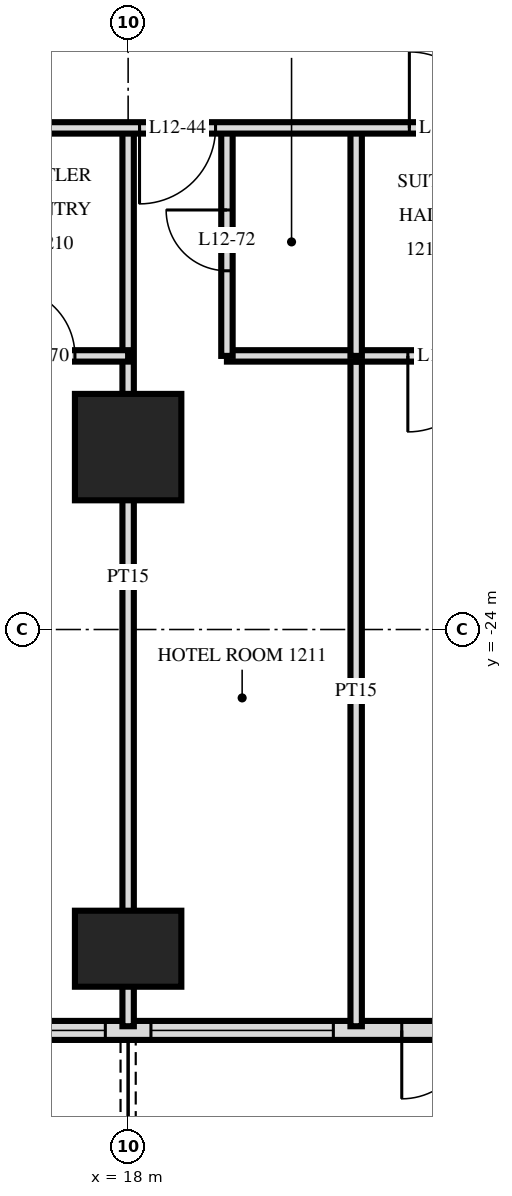
"""IFC4 building model, lengths in metres.
Left out: names, types, materials, properties, quantities, classifications, styles, units other than length and angle.
Written with IfcOpenShell. Run it as: python <this file> out.ifc"""

import sys

from ifc_helpers import new_model, si_unit, direction, frame, frame_2d, origin, origin_2d, place, context, subcontext, project, spatial, rectangle, extrude, element, fill, save


model = new_model("IFC4")
c1 = context("Model", 3, precision=1e-05, world=origin(), true_north=direction((0.0, 1.0)))
c2 = subcontext(c1, "Body", "Model", "MODEL_VIEW")
j1 = project(units=[si_unit("LENGTHUNIT", "METRE"), si_unit("PLANEANGLEUNIT", "RADIAN")], contexts=[c1])
p1 = place(None, origin())
s1 = spatial("IfcSite", under=j1, at=p1, CompositionType="ELEMENT")
p2 = place(p1, origin())
s2 = spatial("IfcBuilding", under=s1, at=p2, CompositionType="ELEMENT")
p3 = place(p2, frame((0.0, 0.0, 52.8)))
s3 = spatial("IfcBuildingStorey", under=s2, at=p3, CompositionType="ELEMENT", Elevation=52.8)
p4 = place(p3, frame((18.0, -28.2, 0.0), z_axis=(0.0, 0.0, 1.0), x_axis=(1.0, 0.0, 0.0)))
e1 = element("IfcColumn", 1, at=p4, inside=s3, PredefinedType="COLUMN", context=c2, shape_type="SweptSolid", body=[
    extrude(rectangle(XDim=1.4, YDim=1.0, at=origin_2d()), origin(), (0.0, 0.0, 1.0), 3.6),
])
p5 = place(p3, frame((18.0, -21.6, 0.0), z_axis=(0.0, 0.0, 1.0), x_axis=(1.0, 0.0, 0.0)))
e2 = element("IfcColumn", 2, at=p5, inside=s3, PredefinedType="COLUMN", context=c2, shape_type="SweptSolid", body=[
    extrude(rectangle(XDim=1.4, YDim=1.4, at=origin_2d()), origin(), (0.0, 0.0, 1.0), 3.6),
])
p6 = place(p3, frame((-28.775, -29.275, 0.0), z_axis=(0.0, 0.0, 1.0), x_axis=(1.0, 0.0, 0.0)))
e3 = element("IfcWall", 3, at=p6, inside=s3, PredefinedType="SOLIDWALL", context=c2, shape_type="SweptSolid", body=[
    extrude(rectangle(XDim=57.551, YDim=0.25, at=frame_2d((28.775, 0.0))), origin(), (0.0, 0.0, 1.0), 3.32),
])
p7 = place(p6, frame((0.575, 0.0, 0.0)))
e4 = element("IfcOpeningElement", 4, at=p7, cuts=e3, PredefinedType="OPENING", context=c2, shape_type="SweptSolid", body=[
    extrude(rectangle(XDim=1.8, YDim=2.4, at=frame_2d((0.9, 1.2))), frame((0.0, 0.135, 0.0), z_axis=(0.0, -1.0, 0.0), x_axis=(1.0, 0.0, 0.0)), (0.0, 0.0, 1.0), 0.27),
])
p8 = place(p6, frame((5.375, 0.0, 0.0)))
e5 = element("IfcOpeningElement", 5, at=p8, cuts=e3, PredefinedType="OPENING", context=c2, shape_type="SweptSolid", body=[
    extrude(rectangle(XDim=1.8, YDim=2.4, at=frame_2d((0.9, 1.2))), frame((0.0, 0.135, 0.0), z_axis=(0.0, -1.0, 0.0), x_axis=(1.0, 0.0, 0.0)), (0.0, 0.0, 1.0), 0.27),
])
p9 = place(p6, frame((8.075, 0.0, 0.3)))
e6 = element("IfcOpeningElement", 6, at=p9, cuts=e3, PredefinedType="OPENING", context=c2, shape_type="SweptSolid", body=[
    extrude(rectangle(XDim=2.4, YDim=2.1, at=frame_2d((1.2, 1.05))), frame((0.0, 0.135, 0.0), z_axis=(0.0, -1.0, 0.0), x_axis=(1.0, 0.0, 0.0)), (0.0, 0.0, 1.0), 0.27),
])
p10 = place(p6, frame((11.375, 0.0, 0.0)))
e7 = element("IfcOpeningElement", 7, at=p10, cuts=e3, PredefinedType="OPENING", context=c2, shape_type="SweptSolid", body=[
    extrude(rectangle(XDim=1.8, YDim=2.4, at=frame_2d((0.9, 1.2))), frame((0.0, 0.135, 0.0), z_axis=(0.0, -1.0, 0.0), x_axis=(1.0, 0.0, 0.0)), (0.0, 0.0, 1.0), 0.27),
])
p11 = place(p6, frame((14.075, 0.0, 0.3)))
e8 = element("IfcOpeningElement", 8, at=p11, cuts=e3, PredefinedType="OPENING", context=c2, shape_type="SweptSolid", body=[
    extrude(rectangle(XDim=2.4, YDim=2.1, at=frame_2d((1.2, 1.05))), frame((0.0, 0.135, 0.0), z_axis=(0.0, -1.0, 0.0), x_axis=(1.0, 0.0, 0.0)), (0.0, 0.0, 1.0), 0.27),
])
p12 = place(p6, frame((17.375, 0.0, 0.0)))
e9 = element("IfcOpeningElement", 9, at=p12, cuts=e3, PredefinedType="OPENING", context=c2, shape_type="SweptSolid", body=[
    extrude(rectangle(XDim=1.8, YDim=2.4, at=frame_2d((0.9, 1.2))), frame((0.0, 0.135, 0.0), z_axis=(0.0, -1.0, 0.0), x_axis=(1.0, 0.0, 0.0)), (0.0, 0.0, 1.0), 0.27),
])
p13 = place(p6, frame((20.075, 0.0, 0.3)))
e10 = element("IfcOpeningElement", 10, at=p13, cuts=e3, PredefinedType="OPENING", context=c2, shape_type="SweptSolid", body=[
    extrude(rectangle(XDim=2.4, YDim=2.1, at=frame_2d((1.2, 1.05))), frame((0.0, 0.135, 0.0), z_axis=(0.0, -1.0, 0.0), x_axis=(1.0, 0.0, 0.0)), (0.0, 0.0, 1.0), 0.27),
])
p14 = place(p6, frame((23.075, 0.0, 0.3)))
e11 = element("IfcOpeningElement", 11, at=p14, cuts=e3, PredefinedType="OPENING", context=c2, shape_type="SweptSolid", body=[
    extrude(rectangle(XDim=2.4, YDim=2.1, at=frame_2d((1.2, 1.05))), frame((0.0, 0.135, 0.0), z_axis=(0.0, -1.0, 0.0), x_axis=(1.0, 0.0, 0.0)), (0.0, 0.0, 1.0), 0.27),
])
p15 = place(p6, frame((26.375, 0.0, 0.0)))
e12 = element("IfcOpeningElement", 12, at=p15, cuts=e3, PredefinedType="OPENING", context=c2, shape_type="SweptSolid", body=[
    extrude(rectangle(XDim=1.8, YDim=2.4, at=frame_2d((0.9, 1.2))), frame((0.0, 0.135, 0.0), z_axis=(0.0, -1.0, 0.0), x_axis=(1.0, 0.0, 0.0)), (0.0, 0.0, 1.0), 0.27),
])
p16 = place(p6, frame((29.375, 0.0, 0.0)))
e13 = element("IfcOpeningElement", 13, at=p16, cuts=e3, PredefinedType="OPENING", context=c2, shape_type="SweptSolid", body=[
    extrude(rectangle(XDim=1.8, YDim=2.4, at=frame_2d((0.9, 1.2))), frame((0.0, 0.135, 0.0), z_axis=(0.0, -1.0, 0.0), x_axis=(1.0, 0.0, 0.0)), (0.0, 0.0, 1.0), 0.27),
])
p17 = place(p6, frame((32.075, 0.0, 0.3)))
e14 = element("IfcOpeningElement", 14, at=p17, cuts=e3, PredefinedType="OPENING", context=c2, shape_type="SweptSolid", body=[
    extrude(rectangle(XDim=2.4, YDim=2.1, at=frame_2d((1.2, 1.05))), frame((0.0, 0.135, 0.0), z_axis=(0.0, -1.0, 0.0), x_axis=(1.0, 0.0, 0.0)), (0.0, 0.0, 1.0), 0.27),
])
p18 = place(p6, frame((35.075, 0.0, 0.3)))
e15 = element("IfcOpeningElement", 15, at=p18, cuts=e3, PredefinedType="OPENING", context=c2, shape_type="SweptSolid", body=[
    extrude(rectangle(XDim=2.4, YDim=2.1, at=frame_2d((1.2, 1.05))), frame((0.0, 0.135, 0.0), z_axis=(0.0, -1.0, 0.0), x_axis=(1.0, 0.0, 0.0)), (0.0, 0.0, 1.0), 0.27),
])
p19 = place(p6, frame((38.375, 0.0, 0.0)))
e16 = element("IfcOpeningElement", 16, at=p19, cuts=e3, PredefinedType="OPENING", context=c2, shape_type="SweptSolid", body=[
    extrude(rectangle(XDim=1.8, YDim=2.4, at=frame_2d((0.9, 1.2))), frame((0.0, 0.135, 0.0), z_axis=(0.0, -1.0, 0.0), x_axis=(1.0, 0.0, 0.0)), (0.0, 0.0, 1.0), 0.27),
])
p20 = place(p6, frame((41.375, 0.0, 0.0)))
e17 = element("IfcOpeningElement", 17, at=p20, cuts=e3, PredefinedType="OPENING", context=c2, shape_type="SweptSolid", body=[
    extrude(rectangle(XDim=1.8, YDim=2.4, at=frame_2d((0.9, 1.2))), frame((0.0, 0.135, 0.0), z_axis=(0.0, -1.0, 0.0), x_axis=(1.0, 0.0, 0.0)), (0.0, 0.0, 1.0), 0.27),
])
p21 = place(p6, frame((44.075, 0.0, 0.3)))
e18 = element("IfcOpeningElement", 18, at=p21, cuts=e3, PredefinedType="OPENING", context=c2, shape_type="SweptSolid", body=[
    extrude(rectangle(XDim=2.4, YDim=2.1, at=frame_2d((1.2, 1.05))), frame((0.0, 0.135, 0.0), z_axis=(0.0, -1.0, 0.0), x_axis=(1.0, 0.0, 0.0)), (0.0, 0.0, 1.0), 0.27),
])
p22 = place(p6, frame((47.075, 0.0, 0.3)))
e19 = element("IfcOpeningElement", 19, at=p22, cuts=e3, PredefinedType="OPENING", context=c2, shape_type="SweptSolid", body=[
    extrude(rectangle(XDim=2.4, YDim=2.1, at=frame_2d((1.2, 1.05))), frame((0.0, 0.135, 0.0), z_axis=(0.0, -1.0, 0.0), x_axis=(1.0, 0.0, 0.0)), (0.0, 0.0, 1.0), 0.27),
])
p23 = place(p6, frame((50.375, 0.0, 0.0)))
e20 = element("IfcOpeningElement", 20, at=p23, cuts=e3, PredefinedType="OPENING", context=c2, shape_type="SweptSolid", body=[
    extrude(rectangle(XDim=1.8, YDim=2.4, at=frame_2d((0.9, 1.2))), frame((0.0, 0.135, 0.0), z_axis=(0.0, -1.0, 0.0), x_axis=(1.0, 0.0, 0.0)), (0.0, 0.0, 1.0), 0.27),
])
p24 = place(p6, frame((53.375, 0.0, 0.0)))
e21 = element("IfcOpeningElement", 21, at=p24, cuts=e3, PredefinedType="OPENING", context=c2, shape_type="SweptSolid", body=[
    extrude(rectangle(XDim=1.8, YDim=2.4, at=frame_2d((0.9, 1.2))), frame((0.0, 0.135, 0.0), z_axis=(0.0, -1.0, 0.0), x_axis=(1.0, 0.0, 0.0)), (0.0, 0.0, 1.0), 0.27),
])
p25 = place(p3, frame((21.0, -20.4, 0.0), z_axis=(0.0, 0.0, 1.0), x_axis=(0.0, 1.0, 0.0)))
e22 = element("IfcWall", 22, at=p25, inside=s3, PredefinedType="PARTITIONING", context=c2, shape_type="SweptSolid", body=[
    extrude(rectangle(XDim=3.0, YDim=0.15, at=frame_2d((1.5, 0.0))), origin(), (0.0, 0.0, 1.0), 3.32),
])
p26 = place(p3, frame((21.0, -29.22, 0.0), z_axis=(0.0, 0.0, 1.0), x_axis=(0.0, 1.0, 0.0)))
e23 = element("IfcWall", 23, at=p26, inside=s3, PredefinedType="PARTITIONING", context=c2, shape_type="SweptSolid", body=[
    extrude(rectangle(XDim=8.82, YDim=0.15, at=frame_2d((4.41, 0.0))), origin(), (0.0, 0.0, 1.0), 3.32),
])
p27 = place(p3, frame((19.3, -20.4, 0.0), z_axis=(0.0, 0.0, 1.0), x_axis=(0.0, 1.0, 0.0)))
e24 = element("IfcWall", 24, at=p27, inside=s3, PredefinedType="PARTITIONING", context=c2, shape_type="SweptSolid", body=[
    extrude(rectangle(XDim=3.0, YDim=0.15, at=frame_2d((1.5, 0.0))), origin(), (0.0, 0.0, 1.0), 3.32),
])
p28 = place(p27, frame((1.12, 0.0, 0.0)))
e25 = element("IfcOpeningElement", 25, at=p28, cuts=e24, PredefinedType="OPENING", context=c2, shape_type="SweptSolid", body=[
    extrude(rectangle(XDim=0.8, YDim=2.1, at=frame_2d((0.4, 1.05))), frame((0.0, 0.085, 0.0), z_axis=(0.0, -1.0, 0.0), x_axis=(1.0, 0.0, 0.0)), (0.0, 0.0, 1.0), 0.17),
])
p29 = place(p3, frame((18.0, -29.22, 0.0), z_axis=(0.0, 0.0, 1.0), x_axis=(0.0, 1.0, 0.0)))
e26 = element("IfcWall", 26, at=p29, inside=s3, PredefinedType="PARTITIONING", context=c2, shape_type="SweptSolid", body=[
    extrude(rectangle(XDim=11.82, YDim=0.15, at=frame_2d((5.91, 0.0))), origin(), (0.0, 0.0, 1.0), 3.32),
])
p30 = place(p3, frame((21.0, -20.4, 0.0), z_axis=(0.0, 0.0, 1.0), x_axis=(1.0, 0.0, 0.0)))
e27 = element("IfcWall", 27, at=p30, inside=s3, PredefinedType="PARTITIONING", context=c2, shape_type="SweptSolid", body=[
    extrude(rectangle(XDim=2.4, YDim=0.15, at=frame_2d((1.2, 0.0))), origin(), (0.0, 0.0, 1.0), 3.32),
])
p31 = place(p30, frame((0.68, 0.0, 0.0)))
e28 = element("IfcOpeningElement", 28, at=p31, cuts=e27, PredefinedType="OPENING", context=c2, shape_type="SweptSolid", body=[
    extrude(rectangle(XDim=1.0, YDim=2.1, at=frame_2d((0.5, 1.05))), frame((0.0, 0.085, 0.0), z_axis=(0.0, -1.0, 0.0), x_axis=(1.0, 0.0, 0.0)), (0.0, 0.0, 1.0), 0.17),
])
p32 = place(p3, frame((10.2, -20.4, 0.0), z_axis=(0.0, 0.0, 1.0), x_axis=(1.0, 0.0, 0.0)))
e29 = element("IfcWall", 29, at=p32, inside=s3, PredefinedType="PARTITIONING", context=c2, shape_type="SweptSolid", body=[
    extrude(rectangle(XDim=7.8, YDim=0.15, at=frame_2d((3.9, 0.0))), origin(), (0.0, 0.0, 1.0), 3.32),
])
p33 = place(p32, frame((0.25, 0.0, 0.0)))
e30 = element("IfcOpeningElement", 30, at=p33, cuts=e29, PredefinedType="OPENING", context=c2, shape_type="SweptSolid", body=[
    extrude(rectangle(XDim=0.8, YDim=2.1, at=frame_2d((0.4, 1.05))), frame((0.0, 0.085, 0.0), z_axis=(0.0, -1.0, 0.0), x_axis=(1.0, 0.0, 0.0)), (0.0, 0.0, 1.0), 0.17),
])
p34 = place(p32, frame((4.03, 0.0, 0.0)))
e31 = element("IfcOpeningElement", 31, at=p34, cuts=e29, PredefinedType="OPENING", context=c2, shape_type="SweptSolid", body=[
    extrude(rectangle(XDim=0.9, YDim=2.1, at=frame_2d((0.45, 1.05))), frame((0.0, 0.085, 0.0), z_axis=(0.0, -1.0, 0.0), x_axis=(1.0, 0.0, 0.0)), (0.0, 0.0, 1.0), 0.17),
])
p35 = place(p32, frame((6.2, 0.0, 0.0)))
e32 = element("IfcOpeningElement", 32, at=p35, cuts=e29, PredefinedType="OPENING", context=c2, shape_type="SweptSolid", body=[
    extrude(rectangle(XDim=0.9, YDim=2.1, at=frame_2d((0.45, 1.05))), frame((0.0, 0.085, 0.0), z_axis=(0.0, -1.0, 0.0), x_axis=(1.0, 0.0, 0.0)), (0.0, 0.0, 1.0), 0.17),
])
p36 = place(p3, frame((19.3, -20.4, 0.0), z_axis=(0.0, 0.0, 1.0), x_axis=(1.0, 0.0, 0.0)))
e33 = element("IfcWall", 33, at=p36, inside=s3, PredefinedType="PARTITIONING", context=c2, shape_type="SweptSolid", body=[
    extrude(rectangle(XDim=1.7, YDim=0.15, at=frame_2d((0.85, 0.0))), origin(), (0.0, 0.0, 1.0), 3.32),
])
p37 = place(p3, frame((-33.12, -17.4, 0.0), z_axis=(0.0, 0.0, 1.0), x_axis=(1.0, 0.0, 0.0)))
e34 = element("IfcWall", 34, at=p37, inside=s3, PredefinedType="PARTITIONING", context=c2, shape_type="SweptSolid", body=[
    extrude(rectangle(XDim=66.24, YDim=0.15, at=frame_2d((33.12, 0.0))), origin(), (0.0, 0.0, 1.0), 3.32),
])
p38 = place(p37, frame((9.27, 0.0, 0.0)))
e35 = element("IfcOpeningElement", 35, at=p38, cuts=e34, PredefinedType="OPENING", context=c2, shape_type="SweptSolid", body=[
    extrude(rectangle(XDim=1.0, YDim=2.1, at=frame_2d((0.5, 1.05))), frame((0.0, 0.085, 0.0), z_axis=(0.0, -1.0, 0.0), x_axis=(1.0, 0.0, 0.0)), (0.0, 0.0, 1.0), 0.17),
])
p39 = place(p37, frame((13.97, 0.0, 0.0)))
e36 = element("IfcOpeningElement", 36, at=p39, cuts=e34, PredefinedType="OPENING", context=c2, shape_type="SweptSolid", body=[
    extrude(rectangle(XDim=1.0, YDim=2.1, at=frame_2d((0.5, 1.05))), frame((0.0, 0.085, 0.0), z_axis=(0.0, -1.0, 0.0), x_axis=(1.0, 0.0, 0.0)), (0.0, 0.0, 1.0), 0.17),
])
p40 = place(p37, frame((15.27, 0.0, 0.0)))
e37 = element("IfcOpeningElement", 37, at=p40, cuts=e34, PredefinedType="OPENING", context=c2, shape_type="SweptSolid", body=[
    extrude(rectangle(XDim=1.0, YDim=2.1, at=frame_2d((0.5, 1.05))), frame((0.0, 0.085, 0.0), z_axis=(0.0, -1.0, 0.0), x_axis=(1.0, 0.0, 0.0)), (0.0, 0.0, 1.0), 0.17),
])
p41 = place(p37, frame((19.97, 0.0, 0.0)))
e38 = element("IfcOpeningElement", 38, at=p41, cuts=e34, PredefinedType="OPENING", context=c2, shape_type="SweptSolid", body=[
    extrude(rectangle(XDim=1.0, YDim=2.1, at=frame_2d((0.5, 1.05))), frame((0.0, 0.085, 0.0), z_axis=(0.0, -1.0, 0.0), x_axis=(1.0, 0.0, 0.0)), (0.0, 0.0, 1.0), 0.17),
])
p42 = place(p37, frame((22.27, 0.0, 0.0)))
e39 = element("IfcOpeningElement", 39, at=p42, cuts=e34, PredefinedType="OPENING", context=c2, shape_type="SweptSolid", body=[
    extrude(rectangle(XDim=1.0, YDim=2.1, at=frame_2d((0.5, 1.05))), frame((0.0, 0.085, 0.0), z_axis=(0.0, -1.0, 0.0), x_axis=(1.0, 0.0, 0.0)), (0.0, 0.0, 1.0), 0.17),
])
p43 = place(p37, frame((28.97, 0.0, 0.0)))
e40 = element("IfcOpeningElement", 40, at=p43, cuts=e34, PredefinedType="OPENING", context=c2, shape_type="SweptSolid", body=[
    extrude(rectangle(XDim=1.0, YDim=2.1, at=frame_2d((0.5, 1.05))), frame((0.0, 0.085, 0.0), z_axis=(0.0, -1.0, 0.0), x_axis=(1.0, 0.0, 0.0)), (0.0, 0.0, 1.0), 0.17),
])
p44 = place(p37, frame((30.27, 0.0, 0.0)))
e41 = element("IfcOpeningElement", 41, at=p44, cuts=e34, PredefinedType="OPENING", context=c2, shape_type="SweptSolid", body=[
    extrude(rectangle(XDim=1.0, YDim=2.1, at=frame_2d((0.5, 1.05))), frame((0.0, 0.085, 0.0), z_axis=(0.0, -1.0, 0.0), x_axis=(1.0, 0.0, 0.0)), (0.0, 0.0, 1.0), 0.17),
])
p45 = place(p37, frame((34.97, 0.0, 0.0)))
e42 = element("IfcOpeningElement", 42, at=p45, cuts=e34, PredefinedType="OPENING", context=c2, shape_type="SweptSolid", body=[
    extrude(rectangle(XDim=1.0, YDim=2.1, at=frame_2d((0.5, 1.05))), frame((0.0, 0.085, 0.0), z_axis=(0.0, -1.0, 0.0), x_axis=(1.0, 0.0, 0.0)), (0.0, 0.0, 1.0), 0.17),
])
p46 = place(p37, frame((36.27, 0.0, 0.0)))
e43 = element("IfcOpeningElement", 43, at=p46, cuts=e34, PredefinedType="OPENING", context=c2, shape_type="SweptSolid", body=[
    extrude(rectangle(XDim=1.0, YDim=2.1, at=frame_2d((0.5, 1.05))), frame((0.0, 0.085, 0.0), z_axis=(0.0, -1.0, 0.0), x_axis=(1.0, 0.0, 0.0)), (0.0, 0.0, 1.0), 0.17),
])
p47 = place(p37, frame((39.82, 0.0, 0.0)))
e44 = element("IfcOpeningElement", 44, at=p47, cuts=e34, PredefinedType="OPENING", context=c2, shape_type="SweptSolid", body=[
    extrude(rectangle(XDim=1.0, YDim=2.1, at=frame_2d((0.5, 1.05))), frame((0.0, 0.085, 0.0), z_axis=(0.0, -1.0, 0.0), x_axis=(1.0, 0.0, 0.0)), (0.0, 0.0, 1.0), 0.17),
])
p48 = place(p37, frame((51.27, 0.0, 0.0)))
e45 = element("IfcOpeningElement", 45, at=p48, cuts=e34, PredefinedType="OPENING", context=c2, shape_type="SweptSolid", body=[
    extrude(rectangle(XDim=1.0, YDim=2.1, at=frame_2d((0.5, 1.05))), frame((0.0, 0.085, 0.0), z_axis=(0.0, -1.0, 0.0), x_axis=(1.0, 0.0, 0.0)), (0.0, 0.0, 1.0), 0.17),
])
p49 = place(p37, frame((4.42, 0.0, 0.0)))
e46 = element("IfcOpeningElement", 46, at=p49, cuts=e34, PredefinedType="OPENING", context=c2, shape_type="SweptSolid", body=[
    extrude(rectangle(XDim=1.0, YDim=2.1, at=frame_2d((0.5, 1.05))), frame((0.0, 0.085, 0.0), z_axis=(0.0, -1.0, 0.0), x_axis=(1.0, 0.0, 0.0)), (0.0, 0.0, 1.0), 0.17),
])
p50 = place(p37, frame((54.82, 0.0, 0.0)))
e47 = element("IfcOpeningElement", 47, at=p50, cuts=e34, PredefinedType="OPENING", context=c2, shape_type="SweptSolid", body=[
    extrude(rectangle(XDim=1.0, YDim=2.1, at=frame_2d((0.5, 1.05))), frame((0.0, 0.085, 0.0), z_axis=(0.0, -1.0, 0.0), x_axis=(1.0, 0.0, 0.0)), (0.0, 0.0, 1.0), 0.17),
])
p51 = place(p21, origin())
e48 = element("IfcWindow", 48, at=p51, inside=s3, PartitioningType="SINGLE_PANEL", PredefinedType="WINDOW", context=c2, shape_type="SweptSolid", body=[
    extrude(rectangle(XDim=2.4, YDim=2.1, at=frame_2d((1.2, 1.05))), frame((0.0, 0.03, 0.0), z_axis=(0.0, -1.0, 0.0), x_axis=(1.0, 0.0, 0.0)), (0.0, 0.0, 1.0), 0.06),
])
fill(e18, e48)
p52 = place(p22, origin())
e49 = element("IfcWindow", 49, at=p52, inside=s3, PartitioningType="SINGLE_PANEL", PredefinedType="WINDOW", context=c2, shape_type="SweptSolid", body=[
    extrude(rectangle(XDim=2.4, YDim=2.1, at=frame_2d((1.2, 1.05))), frame((0.0, 0.03, 0.0), z_axis=(0.0, -1.0, 0.0), x_axis=(1.0, 0.0, 0.0)), (0.0, 0.0, 1.0), 0.06),
])
fill(e19, e49)
p53 = place(p23, frame((0.9, 0.0, 0.0), z_axis=(0.0, 0.0, 1.0), x_axis=(-1.0, 0.0, 0.0)))
e50 = element("IfcDoor", 50, at=p53, inside=s3, OperationType="DOUBLE_DOOR_SINGLE_SWING", PredefinedType="DOOR", context=c2, shape_type="SweptSolid", body=[
    extrude(rectangle(XDim=1.8, YDim=2.4, at=frame_2d((0.0, 1.2))), frame((0.0, -0.025, 0.0), z_axis=(0.0, 1.0, 0.0), x_axis=(-1.0, 0.0, 0.0)), (0.0, 0.0, 1.0), 0.05),
])
fill(e20, e50)
p54 = place(p48, frame((0.5, 0.0, 0.0), z_axis=(0.0, 0.0, 1.0), x_axis=(-1.0, 0.0, 0.0)))
e51 = element("IfcDoor", 51, at=p54, inside=s3, OperationType="SINGLE_SWING_LEFT", PredefinedType="DOOR", context=c2, shape_type="SweptSolid", body=[
    extrude(rectangle(XDim=1.0, YDim=2.1, at=frame_2d((0.0, 1.05))), frame((0.0, -0.025, 0.0), z_axis=(0.0, 1.0, 0.0), x_axis=(-1.0, 0.0, 0.0)), (0.0, 0.0, 1.0), 0.05),
])
fill(e45, e51)
p55 = place(p50, origin())
e52 = element("IfcDoor", 52, at=p55, inside=s3, OperationType="SINGLE_SWING_RIGHT", PredefinedType="DOOR", context=c2, shape_type="SweptSolid", body=[
    extrude(rectangle(XDim=1.0, YDim=2.1, at=frame_2d((0.5, 1.05))), frame((0.0, 0.025, 0.0), z_axis=(0.0, -1.0, 0.0), x_axis=(1.0, 0.0, 0.0)), (0.0, 0.0, 1.0), 0.05),
])
fill(e47, e52)
p56 = place(p35, origin())
e53 = element("IfcDoor", 53, at=p56, inside=s3, OperationType="SINGLE_SWING_RIGHT", PredefinedType="DOOR", context=c2, shape_type="SweptSolid", body=[
    extrude(rectangle(XDim=0.9, YDim=2.1, at=frame_2d((0.45, 1.05))), frame((0.0, 0.025, 0.0), z_axis=(0.0, -1.0, 0.0), x_axis=(1.0, 0.0, 0.0)), (0.0, 0.0, 1.0), 0.05),
])
fill(e32, e53)
p57 = place(p28, origin())
e54 = element("IfcDoor", 54, at=p57, inside=s3, OperationType="SINGLE_SWING_LEFT", PredefinedType="DOOR", context=c2, shape_type="SweptSolid", body=[
    extrude(rectangle(XDim=0.8, YDim=2.1, at=frame_2d((0.4, 1.05))), frame((0.0, 0.025, 0.0), z_axis=(0.0, -1.0, 0.0), x_axis=(1.0, 0.0, 0.0)), (0.0, 0.0, 1.0), 0.05),
])
fill(e25, e54)
p58 = place(p31, frame((0.5, 0.0, 0.0), z_axis=(0.0, 0.0, 1.0), x_axis=(-1.0, 0.0, 0.0)))
e55 = element("IfcDoor", 55, at=p58, inside=s3, OperationType="SINGLE_SWING_LEFT", PredefinedType="DOOR", context=c2, shape_type="SweptSolid", body=[
    extrude(rectangle(XDim=1.0, YDim=2.1, at=frame_2d((0.0, 1.05))), frame((0.0, -0.025, 0.0), z_axis=(0.0, 1.0, 0.0), x_axis=(-1.0, 0.0, 0.0)), (0.0, 0.0, 1.0), 0.05),
])
fill(e28, e55)
save(model, sys.argv[1])
